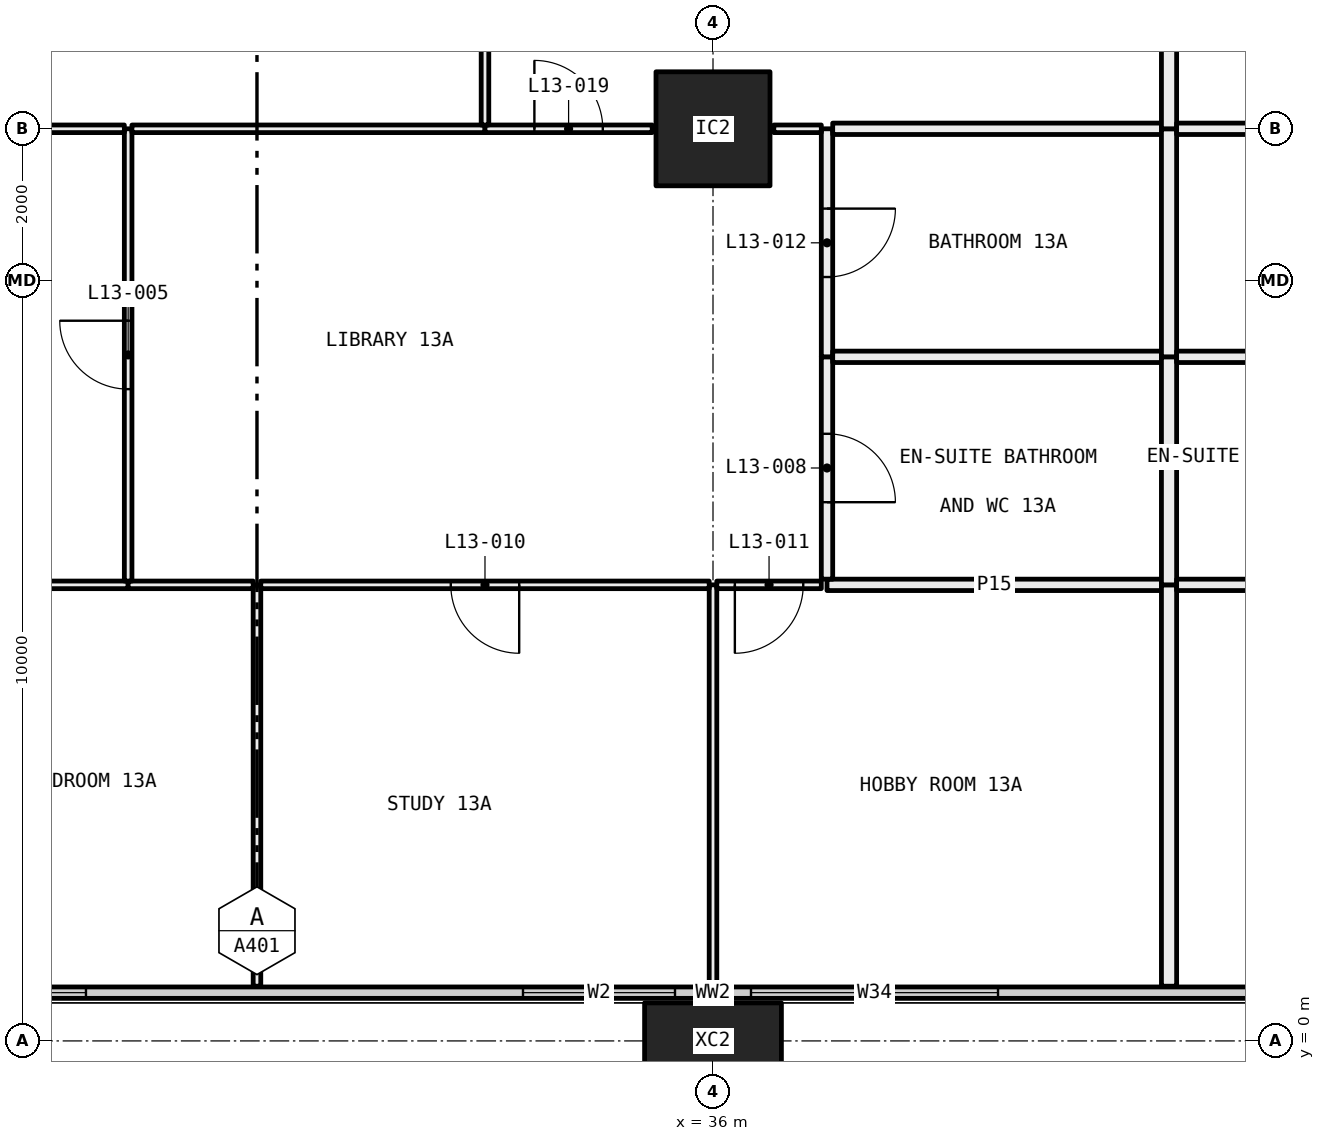
"""IFC4 building model, lengths in metres.
Left out: names, types, materials, properties, quantities, classifications, styles, units other than length and angle.
Written with IfcOpenShell. Run it as: python <this file> out.ifc"""

import sys

from ifc_helpers import new_model, si_unit, direction, frame, frame_2d, origin, origin_2d, place, context, subcontext, project, spatial, rectangle, hollow_rectangle, extrude, element, fill, save


model = new_model("IFC4")
c1 = context("Model", 3, precision=1e-05, world=origin(), true_north=direction((0.0, 1.0)))
c2 = subcontext(c1, "Body", "Model", "MODEL_VIEW")
j1 = project(units=[si_unit("LENGTHUNIT", "METRE"), si_unit("PLANEANGLEUNIT", "RADIAN")], contexts=[c1])
p1 = place(None, origin())
s1 = spatial("IfcSite", under=j1, at=p1, CompositionType="ELEMENT")
p2 = place(p1, origin())
s2 = spatial("IfcBuilding", under=s1, at=p2, CompositionType="ELEMENT")
p3 = place(p2, frame((0.0, 0.0, 57.6)))
s3 = spatial("IfcBuildingStorey", under=s2, at=p3, CompositionType="ELEMENT", Elevation=57.6)
p4 = place(p3, frame((36.0, 0.0, -0.4), z_axis=(0.0, 0.0, 1.0), x_axis=(1.0, 0.0, 0.0)))
e1 = element("IfcColumn", 1, at=p4, inside=s3, PredefinedType="COLUMN", context=c2, shape_type="SweptSolid", body=[
    extrude(hollow_rectangle(XDim=1.8, YDim=1.0, WallThickness=0.07, at=origin_2d()), origin(), (0.0, 0.0, 1.0), 3.45),
])
p5 = place(p3, frame((36.0, 12.0, 0.0), z_axis=(0.0, 0.0, 1.0), x_axis=(1.0, 0.0, 0.0)))
e2 = element("IfcColumn", 2, at=p5, inside=s3, PredefinedType="COLUMN", context=c2, shape_type="SweptSolid", body=[
    extrude(hollow_rectangle(XDim=1.5, YDim=1.5, WallThickness=0.065, at=origin_2d()), origin(), (0.0, 0.0, 1.0), 3.05),
])
p6 = place(p3, frame((6.56, 0.635, 0.0), z_axis=(0.0, 0.0, 1.0), x_axis=(1.0, 0.0, 0.0)))
e3 = element("IfcWall", 3, at=p6, inside=s3, PredefinedType="ELEMENTEDWALL", context=c2, shape_type="SweptSolid", body=[
    extrude(rectangle(XDim=58.88, YDim=0.15, at=frame_2d((29.44, 0.0))), origin(), (0.0, 0.0, 1.0), 3.05),
])
p7 = place(p6, frame((0.44, 0.0, 0.45)))
e4 = element("IfcOpeningElement", 4, at=p7, cuts=e3, PredefinedType="OPENING", context=c2, shape_type="SweptSolid", body=[
    extrude(rectangle(XDim=4.5, YDim=2.55, at=frame_2d((2.25, 1.275))), frame((0.0, 0.085, 0.0), z_axis=(0.0, -1.0, 0.0), x_axis=(1.0, 0.0, 0.0)), (0.0, 0.0, 1.0), 0.17),
])
p8 = place(p6, frame((5.94, 0.0, 0.45)))
e5 = element("IfcOpeningElement", 5, at=p8, cuts=e3, PredefinedType="OPENING", context=c2, shape_type="SweptSolid", body=[
    extrude(rectangle(XDim=3.25, YDim=2.55, at=frame_2d((1.625, 1.275))), frame((0.0, 0.085, 0.0), z_axis=(0.0, -1.0, 0.0), x_axis=(1.0, 0.0, 0.0)), (0.0, 0.0, 1.0), 0.17),
])
p9 = place(p6, frame((13.69, 0.0, 0.45)))
e6 = element("IfcOpeningElement", 6, at=p9, cuts=e3, PredefinedType="OPENING", context=c2, shape_type="SweptSolid", body=[
    extrude(rectangle(XDim=3.25, YDim=2.55, at=frame_2d((1.625, 1.275))), frame((0.0, 0.085, 0.0), z_axis=(0.0, -1.0, 0.0), x_axis=(1.0, 0.0, 0.0)), (0.0, 0.0, 1.0), 0.17),
])
p10 = place(p6, frame((17.94, 0.0, 0.45)))
e7 = element("IfcOpeningElement", 7, at=p10, cuts=e3, PredefinedType="OPENING", context=c2, shape_type="SweptSolid", body=[
    extrude(rectangle(XDim=3.25, YDim=2.55, at=frame_2d((1.625, 1.275))), frame((0.0, 0.085, 0.0), z_axis=(0.0, -1.0, 0.0), x_axis=(1.0, 0.0, 0.0)), (0.0, 0.0, 1.0), 0.17),
])
p11 = place(p6, frame((26.94, 0.0, 0.45)))
e8 = element("IfcOpeningElement", 8, at=p11, cuts=e3, PredefinedType="OPENING", context=c2, shape_type="SweptSolid", body=[
    extrude(rectangle(XDim=2.0, YDim=2.55, at=frame_2d((1.0, 1.275))), frame((0.0, 0.085, 0.0), z_axis=(0.0, -1.0, 0.0), x_axis=(1.0, 0.0, 0.0)), (0.0, 0.0, 1.0), 0.17),
])
p12 = place(p6, frame((29.94, 0.0, 0.45)))
e9 = element("IfcOpeningElement", 9, at=p12, cuts=e3, PredefinedType="OPENING", context=c2, shape_type="SweptSolid", body=[
    extrude(rectangle(XDim=3.25, YDim=2.55, at=frame_2d((1.625, 1.275))), frame((0.0, 0.085, 0.0), z_axis=(0.0, -1.0, 0.0), x_axis=(1.0, 0.0, 0.0)), (0.0, 0.0, 1.0), 0.17),
])
p13 = place(p6, frame((37.69, 0.0, 0.45)))
e10 = element("IfcOpeningElement", 10, at=p13, cuts=e3, PredefinedType="OPENING", context=c2, shape_type="SweptSolid", body=[
    extrude(rectangle(XDim=3.25, YDim=2.55, at=frame_2d((1.625, 1.275))), frame((0.0, 0.085, 0.0), z_axis=(0.0, -1.0, 0.0), x_axis=(1.0, 0.0, 0.0)), (0.0, 0.0, 1.0), 0.17),
])
p14 = place(p6, frame((41.94, 0.0, 0.45)))
e11 = element("IfcOpeningElement", 11, at=p14, cuts=e3, PredefinedType="OPENING", context=c2, shape_type="SweptSolid", body=[
    extrude(rectangle(XDim=3.25, YDim=2.55, at=frame_2d((1.625, 1.275))), frame((0.0, 0.085, 0.0), z_axis=(0.0, -1.0, 0.0), x_axis=(1.0, 0.0, 0.0)), (0.0, 0.0, 1.0), 0.17),
])
p15 = place(p6, frame((50.94, 0.0, 0.45)))
e12 = element("IfcOpeningElement", 12, at=p15, cuts=e3, PredefinedType="OPENING", context=c2, shape_type="SweptSolid", body=[
    extrude(rectangle(XDim=2.0, YDim=2.55, at=frame_2d((1.0, 1.275))), frame((0.0, 0.085, 0.0), z_axis=(0.0, -1.0, 0.0), x_axis=(1.0, 0.0, 0.0)), (0.0, 0.0, 1.0), 0.17),
])
p16 = place(p6, frame((53.94, 0.0, 0.45)))
e13 = element("IfcOpeningElement", 13, at=p16, cuts=e3, PredefinedType="OPENING", context=c2, shape_type="SweptSolid", body=[
    extrude(rectangle(XDim=4.5, YDim=2.55, at=frame_2d((2.25, 1.275))), frame((0.0, 0.085, 0.0), z_axis=(0.0, -1.0, 0.0), x_axis=(1.0, 0.0, 0.0)), (0.0, 0.0, 1.0), 0.17),
])
p17 = place(p3, frame((30.0, 0.72, 0.0), z_axis=(0.0, 0.0, 1.0), x_axis=(0.0, 1.0, 0.0)))
e14 = element("IfcWall", 14, at=p17, inside=s3, PredefinedType="PARTITIONING", context=c2, shape_type="SweptSolid", body=[
    extrude(rectangle(XDim=5.28, YDim=0.1, at=frame_2d((2.64, 0.0))), origin(), (0.0, 0.0, 1.0), 3.05),
])
p18 = place(p3, frame((28.305, 6.0, 0.0), z_axis=(0.0, 0.0, 1.0), x_axis=(-1.0, 0.0, 0.0)))
e15 = element("IfcWall", 15, at=p18, inside=s3, PredefinedType="PARTITIONING", context=c2, shape_type="SweptSolid", body=[
    extrude(rectangle(XDim=4.255, YDim=0.1, at=frame_2d((2.127, 0.0))), origin(), (0.0, 0.0, 1.0), 2.45),
])
p19 = place(p3, frame((29.95, 6.0, 0.0), z_axis=(0.0, 0.0, 1.0), x_axis=(-1.0, 0.0, 0.0)))
e16 = element("IfcWall", 16, at=p19, inside=s3, PredefinedType="PARTITIONING", context=c2, shape_type="SweptSolid", body=[
    extrude(rectangle(XDim=1.645, YDim=0.1, at=frame_2d((0.823, 0.0))), origin(), (0.0, 0.0, 1.0), 3.05),
])
p20 = place(p3, frame((36.0, 0.72, 0.0), z_axis=(0.0, 0.0, 1.0), x_axis=(0.0, 1.0, 0.0)))
e17 = element("IfcWall", 17, at=p20, inside=s3, PredefinedType="PARTITIONING", context=c2, shape_type="SweptSolid", body=[
    extrude(rectangle(XDim=5.28, YDim=0.1, at=frame_2d((2.64, 0.0))), origin(), (0.0, 0.0, 1.0), 2.45),
])
p21 = place(p3, frame((35.95, 6.0, 0.0), z_axis=(0.0, 0.0, 1.0), x_axis=(-1.0, 0.0, 0.0)))
e18 = element("IfcWall", 18, at=p21, inside=s3, PredefinedType="PARTITIONING", context=c2, shape_type="SweptSolid", body=[
    extrude(rectangle(XDim=5.9, YDim=0.1, at=frame_2d((2.95, 0.0))), origin(), (0.0, 0.0, 1.0), 2.45),
])
p22 = place(p21, frame((2.5, 0.0, 0.0)))
e19 = element("IfcOpeningElement", 19, at=p22, cuts=e18, PredefinedType="OPENING", context=c2, shape_type="SweptSolid", body=[
    extrude(rectangle(XDim=0.9, YDim=2.1, at=frame_2d((0.45, 1.05))), frame((0.0, 0.06, 0.0), z_axis=(0.0, -1.0, 0.0), x_axis=(1.0, 0.0, 0.0)), (0.0, 0.0, 1.0), 0.12),
])
p23 = place(p3, frame((37.425, 6.0, 0.0), z_axis=(0.0, 0.0, 1.0), x_axis=(-1.0, 0.0, 0.0)))
e20 = element("IfcWall", 20, at=p23, inside=s3, PredefinedType="PARTITIONING", context=c2, shape_type="SweptSolid", body=[
    extrude(rectangle(XDim=1.375, YDim=0.1, at=frame_2d((0.688, 0.0))), origin(), (0.0, 0.0, 1.0), 2.45),
])
p24 = place(p23, frame((0.238, 0.0, 0.0)))
e21 = element("IfcOpeningElement", 21, at=p24, cuts=e20, PredefinedType="OPENING", context=c2, shape_type="SweptSolid", body=[
    extrude(rectangle(XDim=0.9, YDim=2.1, at=frame_2d((0.45, 1.05))), frame((0.0, 0.06, 0.0), z_axis=(0.0, -1.0, 0.0), x_axis=(1.0, 0.0, 0.0)), (0.0, 0.0, 1.0), 0.12),
])
p25 = place(p3, frame((41.9, 6.0, 0.0), z_axis=(0.0, 0.0, 1.0), x_axis=(-1.0, 0.0, 0.0)))
e22 = element("IfcWall", 22, at=p25, inside=s3, PredefinedType="PARTITIONING", context=c2, shape_type="SweptSolid", body=[
    extrude(rectangle(XDim=4.4, YDim=0.15, at=frame_2d((2.2, 0.0))), origin(), (0.0, 0.0, 1.0), 3.05),
])
p26 = place(p3, frame((42.0, 0.72, 0.0), z_axis=(0.0, 0.0, 1.0), x_axis=(0.0, 1.0, 0.0)))
e23 = element("IfcWall", 23, at=p26, inside=s3, PredefinedType="PARTITIONING", context=c2, shape_type="SweptSolid", body=[
    extrude(rectangle(XDim=5.28, YDim=0.2, at=frame_2d((2.64, 0.0))), origin(), (0.0, 0.0, 1.0), 3.05),
])
p27 = place(p3, frame((28.305, 6.05, 0.0), z_axis=(0.0, 0.0, 1.0), x_axis=(0.0, 1.0, 0.0)))
e24 = element("IfcWall", 24, at=p27, inside=s3, PredefinedType="PARTITIONING", context=c2, shape_type="SweptSolid", body=[
    extrude(rectangle(XDim=5.95, YDim=0.1, at=frame_2d((2.975, 0.0))), origin(), (0.0, 0.0, 1.0), 2.45),
])
p28 = place(p27, frame((2.525, 0.0, 0.0)))
e25 = element("IfcOpeningElement", 25, at=p28, cuts=e24, PredefinedType="OPENING", context=c2, shape_type="SweptSolid", body=[
    extrude(rectangle(XDim=0.9, YDim=2.1, at=frame_2d((0.45, 1.05))), frame((0.0, 0.06, 0.0), z_axis=(0.0, -1.0, 0.0), x_axis=(1.0, 0.0, 0.0)), (0.0, 0.0, 1.0), 0.12),
])
p29 = place(p3, frame((28.255, 12.0, 0.0), z_axis=(0.0, 0.0, 1.0), x_axis=(-1.0, 0.0, 0.0)))
e26 = element("IfcWall", 26, at=p29, inside=s3, PredefinedType="PARTITIONING", context=c2, shape_type="SweptSolid", body=[
    extrude(rectangle(XDim=3.455, YDim=0.1, at=frame_2d((1.728, 0.0))), origin(), (0.0, 0.0, 1.0), 2.45),
])
p30 = place(p3, frame((37.5, 6.075, 0.0), z_axis=(0.0, 0.0, 1.0), x_axis=(0.0, 1.0, 0.0)))
e27 = element("IfcWall", 27, at=p30, inside=s3, PredefinedType="PARTITIONING", context=c2, shape_type="SweptSolid", body=[
    extrude(rectangle(XDim=2.925, YDim=0.15, at=frame_2d((1.462, 0.0))), origin(), (0.0, 0.0, 1.0), 3.05),
])
p31 = place(p30, frame((1.012, 0.0, 0.0)))
e28 = element("IfcOpeningElement", 28, at=p31, cuts=e27, PredefinedType="OPENING", context=c2, shape_type="SweptSolid", body=[
    extrude(rectangle(XDim=0.9, YDim=2.1, at=frame_2d((0.45, 1.05))), frame((0.0, 0.085, 0.0), z_axis=(0.0, -1.0, 0.0), x_axis=(1.0, 0.0, 0.0)), (0.0, 0.0, 1.0), 0.17),
])
p32 = place(p3, frame((37.5, 9.0, 0.0), z_axis=(0.0, 0.0, 1.0), x_axis=(0.0, 1.0, 0.0)))
e29 = element("IfcWall", 29, at=p32, inside=s3, PredefinedType="PARTITIONING", context=c2, shape_type="SweptSolid", body=[
    extrude(rectangle(XDim=3.0, YDim=0.15, at=frame_2d((1.5, 0.0))), origin(), (0.0, 0.0, 1.0), 2.45),
])
p33 = place(p32, frame((1.05, 0.0, 0.0)))
e30 = element("IfcOpeningElement", 30, at=p33, cuts=e29, PredefinedType="OPENING", context=c2, shape_type="SweptSolid", body=[
    extrude(rectangle(XDim=0.9, YDim=2.1, at=frame_2d((0.45, 1.05))), frame((0.0, 0.085, 0.0), z_axis=(0.0, -1.0, 0.0), x_axis=(1.0, 0.0, 0.0)), (0.0, 0.0, 1.0), 0.17),
])
p34 = place(p3, frame((33.0, 12.0, 0.0), z_axis=(0.0, 0.0, 1.0), x_axis=(-1.0, 0.0, 0.0)))
e31 = element("IfcWall", 31, at=p34, inside=s3, PredefinedType="PARTITIONING", context=c2, shape_type="SweptSolid", body=[
    extrude(rectangle(XDim=4.645, YDim=0.1, at=frame_2d((2.323, 0.0))), origin(), (0.0, 0.0, 1.0), 2.45),
])
p35 = place(p3, frame((35.2, 12.0, 0.0), z_axis=(0.0, 0.0, 1.0), x_axis=(-1.0, 0.0, 0.0)))
e32 = element("IfcWall", 32, at=p35, inside=s3, PredefinedType="PARTITIONING", context=c2, shape_type="SweptSolid", body=[
    extrude(rectangle(XDim=2.2, YDim=0.1, at=frame_2d((1.1, 0.0))), origin(), (0.0, 0.0, 1.0), 2.45),
])
p36 = place(p35, frame((0.65, 0.0, 0.0)))
e33 = element("IfcOpeningElement", 33, at=p36, cuts=e32, PredefinedType="OPENING", context=c2, shape_type="SweptSolid", body=[
    extrude(rectangle(XDim=0.9, YDim=2.1, at=frame_2d((0.45, 1.05))), frame((0.0, 0.06, 0.0), z_axis=(0.0, -1.0, 0.0), x_axis=(1.0, 0.0, 0.0)), (0.0, 0.0, 1.0), 0.12),
])
p37 = place(p3, frame((37.425, 12.0, 0.0), z_axis=(0.0, 0.0, 1.0), x_axis=(-1.0, 0.0, 0.0)))
e34 = element("IfcWall", 34, at=p37, inside=s3, PredefinedType="PARTITIONING", context=c2, shape_type="SweptSolid", body=[
    extrude(rectangle(XDim=0.625, YDim=0.1, at=frame_2d((0.312, 0.0))), origin(), (0.0, 0.0, 1.0), 2.45),
])
p38 = place(p3, frame((41.9, 9.0, 0.0), z_axis=(0.0, 0.0, 1.0), x_axis=(-1.0, 0.0, 0.0)))
e35 = element("IfcWall", 35, at=p38, inside=s3, PredefinedType="PARTITIONING", context=c2, shape_type="SweptSolid", body=[
    extrude(rectangle(XDim=4.325, YDim=0.15, at=frame_2d((2.163, 0.0))), origin(), (0.0, 0.0, 1.0), 3.05),
])
p39 = place(p3, frame((42.0, 6.0, 0.0), z_axis=(0.0, 0.0, 1.0), x_axis=(0.0, 1.0, 0.0)))
e36 = element("IfcWall", 36, at=p39, inside=s3, PredefinedType="PARTITIONING", context=c2, shape_type="SweptSolid", body=[
    extrude(rectangle(XDim=3.0, YDim=0.2, at=frame_2d((1.5, 0.0))), origin(), (0.0, 0.0, 1.0), 3.05),
])
p40 = place(p3, frame((41.9, 12.0, 0.0), z_axis=(0.0, 0.0, 1.0), x_axis=(-1.0, 0.0, 0.0)))
e37 = element("IfcWall", 37, at=p40, inside=s3, PredefinedType="PARTITIONING", context=c2, shape_type="SweptSolid", body=[
    extrude(rectangle(XDim=4.325, YDim=0.15, at=frame_2d((2.163, 0.0))), origin(), (0.0, 0.0, 1.0), 2.45),
])
p41 = place(p3, frame((42.0, 9.0, 0.0), z_axis=(0.0, 0.0, 1.0), x_axis=(0.0, 1.0, 0.0)))
e38 = element("IfcWall", 38, at=p41, inside=s3, PredefinedType="PARTITIONING", context=c2, shape_type="SweptSolid", body=[
    extrude(rectangle(XDim=3.0, YDim=0.2, at=frame_2d((1.5, 0.0))), origin(), (0.0, 0.0, 1.0), 2.45),
])
p42 = place(p3, frame((33.0, 12.05, 0.0), z_axis=(0.0, 0.0, 1.0), x_axis=(0.0, 1.0, 0.0)))
e39 = element("IfcWall", 39, at=p42, inside=s3, PredefinedType="PARTITIONING", context=c2, shape_type="SweptSolid", body=[
    extrude(rectangle(XDim=5.85, YDim=0.1, at=frame_2d((2.925, 0.0))), origin(), (0.0, 0.0, 1.0), 2.45),
])
p43 = place(p3, frame((42.0, 12.0, 0.0), z_axis=(0.0, 0.0, 1.0), x_axis=(0.0, 1.0, 0.0)))
e40 = element("IfcWall", 40, at=p43, inside=s3, PredefinedType="PARTITIONING", context=c2, shape_type="SweptSolid", body=[
    extrude(rectangle(XDim=5.9, YDim=0.2, at=frame_2d((2.95, 0.0))), origin(), (0.0, 0.0, 1.0), 2.45),
])
p44 = place(p3, frame((46.5, 6.0, 0.0), z_axis=(0.0, 0.0, 1.0), x_axis=(-1.0, 0.0, 0.0)))
e41 = element("IfcWall", 41, at=p44, inside=s3, PredefinedType="PARTITIONING", context=c2, shape_type="SweptSolid", body=[
    extrude(rectangle(XDim=4.4, YDim=0.15, at=frame_2d((2.2, 0.0))), origin(), (0.0, 0.0, 1.0), 3.05),
])
p45 = place(p44, frame((1.75, 0.0, 0.0)))
e42 = element("IfcOpeningElement", 42, at=p45, cuts=e41, PredefinedType="OPENING", context=c2, shape_type="SweptSolid", body=[
    extrude(rectangle(XDim=0.9, YDim=2.1, at=frame_2d((0.45, 1.05))), frame((0.0, 0.085, 0.0), z_axis=(0.0, -1.0, 0.0), x_axis=(1.0, 0.0, 0.0)), (0.0, 0.0, 1.0), 0.17),
])
p46 = place(p3, frame((46.5, 9.0, 0.0), z_axis=(0.0, 0.0, 1.0), x_axis=(-1.0, 0.0, 0.0)))
e43 = element("IfcWall", 43, at=p46, inside=s3, PredefinedType="PARTITIONING", context=c2, shape_type="SweptSolid", body=[
    extrude(rectangle(XDim=4.4, YDim=0.15, at=frame_2d((2.2, 0.0))), origin(), (0.0, 0.0, 1.0), 3.05),
])
p47 = place(p3, frame((46.425, 12.0, 0.0), z_axis=(0.0, 0.0, 1.0), x_axis=(-1.0, 0.0, 0.0)))
e44 = element("IfcWall", 44, at=p47, inside=s3, PredefinedType="PARTITIONING", context=c2, shape_type="SweptSolid", body=[
    extrude(rectangle(XDim=4.325, YDim=0.15, at=frame_2d((2.163, 0.0))), origin(), (0.0, 0.0, 1.0), 2.45),
])
p48 = place(p10, origin())
e45 = element("IfcWindow", 45, at=p48, inside=s3, PartitioningType="SINGLE_PANEL", PredefinedType="WINDOW", context=c2, shape_type="SweptSolid", body=[
    extrude(rectangle(XDim=3.25, YDim=2.55, at=frame_2d((1.625, 1.275))), frame((0.0, 0.03, 0.0), z_axis=(0.0, -1.0, 0.0), x_axis=(1.0, 0.0, 0.0)), (0.0, 0.0, 1.0), 0.06),
])
fill(e7, e45)
p49 = place(p11, origin())
e46 = element("IfcWindow", 46, at=p49, inside=s3, PartitioningType="SINGLE_PANEL", PredefinedType="WINDOW", context=c2, shape_type="SweptSolid", body=[
    extrude(rectangle(XDim=2.0, YDim=2.55, at=frame_2d((1.0, 1.275))), frame((0.0, 0.03, 0.0), z_axis=(0.0, -1.0, 0.0), x_axis=(1.0, 0.0, 0.0)), (0.0, 0.0, 1.0), 0.06),
])
fill(e8, e46)
p50 = place(p12, origin())
e47 = element("IfcWindow", 47, at=p50, inside=s3, PartitioningType="SINGLE_PANEL", PredefinedType="WINDOW", context=c2, shape_type="SweptSolid", body=[
    extrude(rectangle(XDim=3.25, YDim=2.55, at=frame_2d((1.625, 1.275))), frame((0.0, 0.03, 0.0), z_axis=(0.0, -1.0, 0.0), x_axis=(1.0, 0.0, 0.0)), (0.0, 0.0, 1.0), 0.06),
])
fill(e9, e47)
p51 = place(p28, origin())
e48 = element("IfcDoor", 48, at=p51, inside=s3, OperationType="SINGLE_SWING_LEFT", PredefinedType="DOOR", context=c2, shape_type="SweptSolid", body=[
    extrude(rectangle(XDim=0.9, YDim=2.1, at=frame_2d((0.45, 1.05))), frame((0.0, 0.025, 0.0), z_axis=(0.0, -1.0, 0.0), x_axis=(1.0, 0.0, 0.0)), (0.0, 0.0, 1.0), 0.05),
])
fill(e25, e48)
p52 = place(p31, frame((0.9, 0.0, 0.0), x_axis=(-1.0, 0.0, 0.0)))
e49 = element("IfcDoor", 49, at=p52, inside=s3, OperationType="SINGLE_SWING_LEFT", PredefinedType="DOOR", context=c2, shape_type="SweptSolid", body=[
    extrude(rectangle(XDim=0.9, YDim=2.1, at=frame_2d((0.45, 1.05))), frame((0.0, 0.025, 0.0), z_axis=(0.0, -1.0, 0.0), x_axis=(1.0, 0.0, 0.0)), (0.0, 0.0, 1.0), 0.05),
])
fill(e28, e49)
p53 = place(p22, origin())
e50 = element("IfcDoor", 50, at=p53, inside=s3, OperationType="SINGLE_SWING_RIGHT", PredefinedType="DOOR", context=c2, shape_type="SweptSolid", body=[
    extrude(rectangle(XDim=0.9, YDim=2.1, at=frame_2d((0.45, 1.05))), frame((0.0, 0.025, 0.0), z_axis=(0.0, -1.0, 0.0), x_axis=(1.0, 0.0, 0.0)), (0.0, 0.0, 1.0), 0.05),
])
fill(e19, e50)
p54 = place(p24, origin())
e51 = element("IfcDoor", 51, at=p54, inside=s3, OperationType="SINGLE_SWING_LEFT", PredefinedType="DOOR", context=c2, shape_type="SweptSolid", body=[
    extrude(rectangle(XDim=0.9, YDim=2.1, at=frame_2d((0.45, 1.05))), frame((0.0, 0.025, 0.0), z_axis=(0.0, -1.0, 0.0), x_axis=(1.0, 0.0, 0.0)), (0.0, 0.0, 1.0), 0.05),
])
fill(e21, e51)
p55 = place(p33, frame((0.9, 0.0, 0.0), x_axis=(-1.0, 0.0, 0.0)))
e52 = element("IfcDoor", 52, at=p55, inside=s3, OperationType="SINGLE_SWING_RIGHT", PredefinedType="DOOR", context=c2, shape_type="SweptSolid", body=[
    extrude(rectangle(XDim=0.9, YDim=2.1, at=frame_2d((0.45, 1.05))), frame((0.0, 0.025, 0.0), z_axis=(0.0, -1.0, 0.0), x_axis=(1.0, 0.0, 0.0)), (0.0, 0.0, 1.0), 0.05),
])
fill(e30, e52)
p56 = place(p36, frame((0.9, 0.0, 0.0), x_axis=(-1.0, 0.0, 0.0)))
e53 = element("IfcDoor", 53, at=p56, inside=s3, OperationType="SINGLE_SWING_RIGHT", PredefinedType="DOOR", context=c2, shape_type="SweptSolid", body=[
    extrude(rectangle(XDim=0.9, YDim=2.1, at=frame_2d((0.45, 1.05))), frame((0.0, 0.025, 0.0), z_axis=(0.0, -1.0, 0.0), x_axis=(1.0, 0.0, 0.0)), (0.0, 0.0, 1.0), 0.05),
])
fill(e33, e53)
save(model, sys.argv[1])
